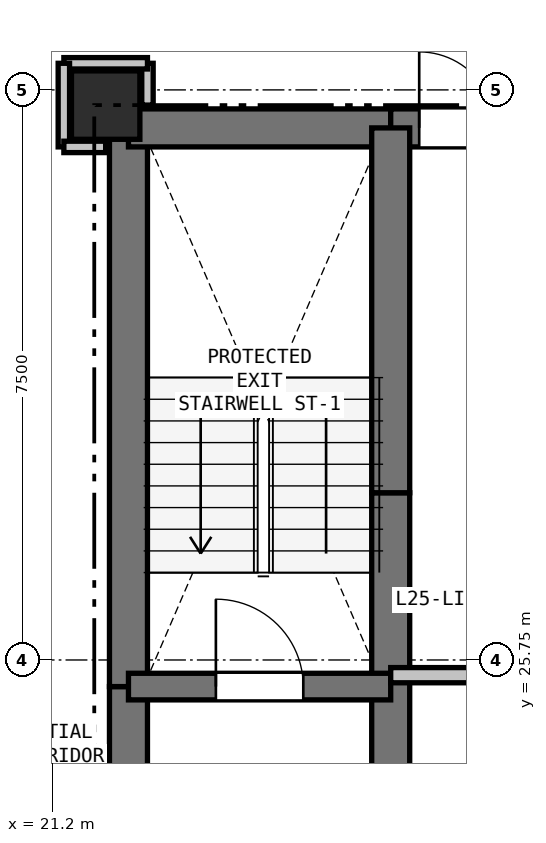
"""IFC4 building model, lengths in metres.
Left out: names, types, materials, properties, quantities, classifications, styles, units other than length and angle.
Written with IfcOpenShell. Run it as: python <this file> out.ifc"""

import sys

from ifc_helpers import new_model, si_unit, direction, frame, frame_2d, origin, origin_2d, place, context, subcontext, project, spatial, rectangle, extrude, element, fill, save


model = new_model("IFC4")
c1 = context("Model", 3, precision=1e-05, world=origin(), true_north=direction((0.0, 1.0)))
c2 = subcontext(c1, "Body", "Model", "MODEL_VIEW")
j1 = project(units=[si_unit("LENGTHUNIT", "METRE"), si_unit("PLANEANGLEUNIT", "RADIAN")], contexts=[c1])
p1 = place(None, origin())
s1 = spatial("IfcSite", under=j1, at=p1, CompositionType="ELEMENT")
p2 = place(p1, origin())
s2 = spatial("IfcBuilding", under=s1, at=p2, CompositionType="ELEMENT")
p3 = place(p2, frame((0.0, 0.0, 93.3)))
s3 = spatial("IfcBuildingStorey", under=s2, at=p3, CompositionType="ELEMENT", Elevation=93.3)
p4 = place(p3, frame((21.9, 33.05, 0.0), z_axis=(0.0, 0.0, 1.0), x_axis=(1.0, 0.0, 0.0)))
e1 = element("IfcColumn", 1, at=p4, inside=s3, PredefinedType="COLUMN", context=c2, shape_type="SweptSolid", body=[
    extrude(rectangle(XDim=0.9, YDim=0.9, at=origin_2d()), origin(), (0.0, 0.0, 1.0), 3.3),
])
p5 = place(p3, frame((22.2, 20.75, 0.0), z_axis=(0.0, 0.0, 1.0), x_axis=(0.0, 1.0, 0.0)))
e2 = element("IfcWall", 2, at=p5, inside=s3, PredefinedType="SHEAR", context=c2, shape_type="SweptSolid", body=[
    extrude(rectangle(XDim=4.65, YDim=0.5, at=frame_2d((2.325, 0.0))), origin(), (0.0, 0.0, 1.0), 3.05),
])
p6 = place(p3, frame((22.2, 25.4, 0.0), z_axis=(0.0, 0.0, 1.0), x_axis=(0.0, 1.0, 0.0)))
e3 = element("IfcWall", 3, at=p6, inside=s3, PredefinedType="SHEAR", context=c2, shape_type="SweptSolid", body=[
    extrude(rectangle(XDim=7.35, YDim=0.5, at=frame_2d((3.675, 0.0))), origin(), (0.0, 0.0, 1.0), 3.05),
])
p7 = place(p3, frame((22.2, 32.75, 0.0), z_axis=(0.0, 0.0, 1.0), x_axis=(1.0, 0.0, 0.0)))
e4 = element("IfcWall", 4, at=p7, inside=s3, PredefinedType="SHEAR", context=c2, shape_type="SweptSolid", body=[
    extrude(rectangle(XDim=3.45, YDim=0.5, at=frame_2d((1.725, 0.0))), origin(), (0.0, 0.0, 1.0), 3.05),
])
p8 = place(p3, frame((25.65, 32.75, 0.0), z_axis=(0.0, 0.0, 1.0), x_axis=(1.0, 0.0, 0.0)))
e5 = element("IfcWall", 5, at=p8, inside=s3, PredefinedType="SHEAR", context=c2, shape_type="SweptSolid", body=[
    extrude(rectangle(XDim=1.75, YDim=0.5, at=frame_2d((0.875, 0.0))), origin(), (0.0, 0.0, 1.0), 3.05),
])
p9 = place(p8, frame((0.375, 0.0, 0.0)))
e6 = element("IfcOpeningElement", 6, at=p9, cuts=e5, PredefinedType="OPENING", context=c2, shape_type="SweptSolid", body=[
    extrude(rectangle(XDim=1.0, YDim=2.15, at=frame_2d((0.5, 1.075))), frame((0.0, 0.26, 0.0), z_axis=(0.0, -1.0, 0.0), x_axis=(1.0, 0.0, 0.0)), (0.0, 0.0, 1.0), 0.52),
])
p10 = place(p3, frame((25.65, 22.75, 0.0), z_axis=(0.0, 0.0, 1.0), x_axis=(0.0, 1.0, 0.0)))
e7 = element("IfcWall", 7, at=p10, inside=s3, PredefinedType="SHEAR", context=c2, shape_type="SweptSolid", body=[
    extrude(rectangle(XDim=2.8, YDim=0.5, at=frame_2d((1.4, 0.0))), origin(), (0.0, 0.0, 1.0), 3.05),
])
p11 = place(p3, frame((25.65, 25.55, 0.0), z_axis=(0.0, 0.0, 1.0), x_axis=(0.0, 1.0, 0.0)))
e8 = element("IfcWall", 8, at=p11, inside=s3, PredefinedType="SHEAR", context=c2, shape_type="SweptSolid", body=[
    extrude(rectangle(XDim=2.4, YDim=0.5, at=frame_2d((1.2, 0.0))), origin(), (0.0, 0.0, 1.0), 3.05),
])
p12 = place(p3, frame((25.65, 27.95, 0.0), z_axis=(0.0, 0.0, 1.0), x_axis=(0.0, 1.0, 0.0)))
e9 = element("IfcWall", 9, at=p12, inside=s3, PredefinedType="SHEAR", context=c2, shape_type="SweptSolid", body=[
    extrude(rectangle(XDim=4.8, YDim=0.5, at=frame_2d((2.4, 0.0))), origin(), (0.0, 0.0, 1.0), 3.05),
])
p13 = place(p3, frame((22.2, 25.4, 0.0), z_axis=(0.0, 0.0, 1.0), x_axis=(1.0, 0.0, 0.0)))
e10 = element("IfcWall", 10, at=p13, inside=s3, PredefinedType="SHEAR", context=c2, shape_type="SweptSolid", body=[
    extrude(rectangle(XDim=3.45, YDim=0.35, at=frame_2d((1.725, 0.0))), origin(), (0.0, 0.0, 1.0), 3.05),
])
p14 = place(p13, frame((1.15, 0.0, 0.0)))
e11 = element("IfcOpeningElement", 11, at=p14, cuts=e10, PredefinedType="OPENING", context=c2, shape_type="SweptSolid", body=[
    extrude(rectangle(XDim=1.15, YDim=2.15, at=frame_2d((0.575, 1.075))), frame((0.0, 0.185, 0.0), z_axis=(0.0, -1.0, 0.0), x_axis=(1.0, 0.0, 0.0)), (0.0, 0.0, 1.0), 0.37),
])
p15 = place(p3, frame((25.65, 25.55, 0.0), z_axis=(0.0, 0.0, 1.0), x_axis=(1.0, 0.0, 0.0)))
e12 = element("IfcWall", 12, at=p15, inside=s3, PredefinedType="PARTITIONING", context=c2, shape_type="SweptSolid", body=[
    extrude(rectangle(XDim=4.95, YDim=0.2, at=frame_2d((2.475, 0.0))), origin(), (0.0, 0.0, 1.0), 3.05),
])
p16 = place(p3, frame((22.45, 33.05, 0.0), z_axis=(0.0, 0.0, 1.0), x_axis=(0.0, 1.0, 0.0)))
e13 = element("IfcWall", 13, at=p16, inside=s3, PredefinedType="PARTITIONING", context=c2, shape_type="SweptSolid", body=[
    extrude(rectangle(XDim=0.55, YDim=0.15, at=frame_2d((0.275, 0.0))), origin(), (0.0, 0.0, 1.0), 2.498),
])
p17 = place(p3, frame((22.45, 33.6, 0.0), z_axis=(0.0, 0.0, 1.0), x_axis=(-1.0, 0.0, 0.0)))
e14 = element("IfcWall", 14, at=p17, inside=s3, PredefinedType="PARTITIONING", context=c2, shape_type="SweptSolid", body=[
    extrude(rectangle(XDim=1.1, YDim=0.15, at=frame_2d((0.55, 0.0))), origin(), (0.0, 0.0, 1.0), 3.05),
])
p18 = place(p3, frame((21.35, 33.6, 0.0), z_axis=(0.0, 0.0, 1.0), x_axis=(0.0, -1.0, 0.0)))
e15 = element("IfcWall", 15, at=p18, inside=s3, PredefinedType="PARTITIONING", context=c2, shape_type="SweptSolid", body=[
    extrude(rectangle(XDim=1.1, YDim=0.15, at=frame_2d((0.55, 0.0))), origin(), (0.0, 0.0, 1.0), 2.423),
])
p19 = place(p3, frame((21.35, 32.5, 0.0), z_axis=(0.0, 0.0, 1.0), x_axis=(1.0, 0.0, 0.0)))
e16 = element("IfcWall", 16, at=p19, inside=s3, PredefinedType="PARTITIONING", context=c2, shape_type="SweptSolid", body=[
    extrude(rectangle(XDim=0.55, YDim=0.15, at=frame_2d((0.275, 0.0))), origin(), (0.0, 0.0, 1.0), 2.498),
])
p20 = place(p9, origin())
e17 = element("IfcDoor", 17, at=p20, inside=s3, OperationType="SINGLE_SWING_LEFT", PredefinedType="DOOR", context=c2, shape_type="SweptSolid", body=[
    extrude(rectangle(XDim=1.0, YDim=2.15, at=frame_2d((0.5, 1.075))), frame((0.0, 0.025, 0.0), z_axis=(0.0, -1.0, 0.0), x_axis=(1.0, 0.0, 0.0)), (0.0, 0.0, 1.0), 0.05),
])
fill(e6, e17)
p21 = place(p14, origin())
e18 = element("IfcDoor", 18, at=p21, inside=s3, OperationType="SINGLE_SWING_LEFT", PredefinedType="DOOR", context=c2, shape_type="SweptSolid", body=[
    extrude(rectangle(XDim=1.15, YDim=2.15, at=frame_2d((0.575, 1.075))), frame((0.0, 0.025, 0.0), z_axis=(0.0, -1.0, 0.0), x_axis=(1.0, 0.0, 0.0)), (0.0, 0.0, 1.0), 0.05),
])
fill(e11, e18)
save(model, sys.argv[1])
